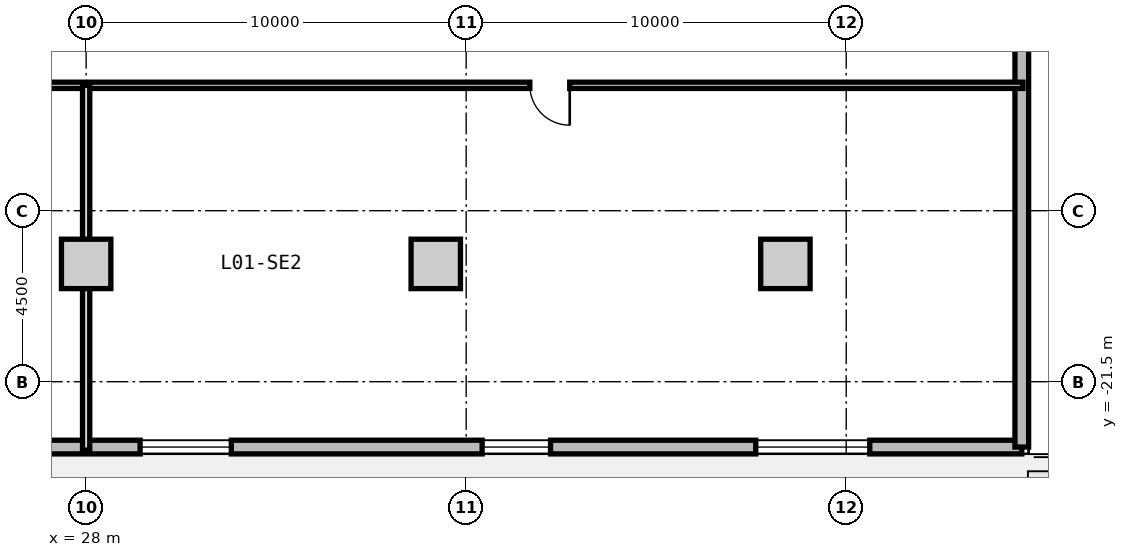
"""IFC4 building model, lengths in metres.
Left out: names, types, materials, properties, quantities, classifications, styles, units other than length and angle.
Written with IfcOpenShell. Run it as: python <this file> out.ifc"""

import sys

from ifc_helpers import new_model, si_unit, direction, frame, frame_2d, origin, origin_2d, place, context, subcontext, project, spatial, rectangle, extrude, source, transform, mapped, element, fill, save


model = new_model("IFC4")
c1 = context("Model", 3, precision=1e-05, world=origin(), true_north=direction((0.0, 1.0)))
c2 = subcontext(c1, "Body", "Model", "MODEL_VIEW")
j1 = project(units=[si_unit("LENGTHUNIT", "METRE"), si_unit("PLANEANGLEUNIT", "RADIAN")], contexts=[c1])
p1 = place(None, origin())
s1 = spatial("IfcSite", under=j1, at=p1, CompositionType="ELEMENT")
p2 = place(p1, origin())
s2 = spatial("IfcBuilding", under=s1, at=p2, CompositionType="ELEMENT")
p3 = place(p2, frame((0.0, 0.0, 4.2)))
s3 = spatial("IfcBuildingStorey", under=s2, at=p3, CompositionType="ELEMENT", Elevation=4.2)
m1 = source(origin(), c2, "Body", "SweptSolid", [
    extrude(rectangle(XDim=1.3, YDim=1.3, at=origin_2d()), origin(), (0.0, 0.0, 1.0), 4.2),
])
for number, where, z_axis, x_axis in (
    (1, (28.0, -18.4, 0.0), (0.0, 0.0, 1.0), (1.0, 0.0, 0.0)),
    (2, (37.2, -18.4, 0.0), (0.0, 0.0, 1.0), (1.0, 0.0, 0.0)),
    (3, (46.4, -18.4, 0.0), (0.0, 0.0, 1.0), (1.0, 0.0, 0.0)),
):
    element("IfcColumn", number, at=place(p3, frame(where, z_axis=z_axis, x_axis=x_axis)), inside=s3, PredefinedType="COLUMN", context=c2, shape_type="MappedRepresentation", body=[
        mapped(m1, transform((0.0, 0.0, 0.0), x_axis=(1.0, 0.0, 0.0), y_axis=(0.0, 1.0, 0.0), z_axis=(0.0, 0.0, 1.0), scale=1.0)),
    ])
m2 = source(origin(), c2, "Body", "SweptSolid", [
    extrude(rectangle(XDim=105.24, YDim=0.36, at=frame_2d((52.62, 0.0))), origin(), (0.0, 0.0, 1.0), 3.88),
])
p4 = place(p3, frame((52.62, -23.22, 0.0), z_axis=(0.0, 0.0, 1.0), x_axis=(-1.0, 0.0, 0.0)))
e4 = element("IfcWall", 4, at=p4, inside=s3, PredefinedType="SOLIDWALL", context=c2, shape_type="MappedRepresentation", body=[
    mapped(m2, transform((0.0, 0.0, 0.0), x_axis=(1.0, 0.0, 0.0), y_axis=(0.0, 1.0, 0.0), z_axis=(0.0, 0.0, 1.0), scale=1.0)),
])
p5 = place(p4, frame((54.97, 0.0, 0.0)))
e5 = element("IfcOpeningElement", 5, at=p5, cuts=e4, PredefinedType="OPENING", context=c2, shape_type="SweptSolid", body=[
    extrude(rectangle(XDim=1.15, YDim=2.25, at=frame_2d((0.575, 1.125))), frame((0.0, 0.19, 0.0), z_axis=(0.0, -1.0, 0.0), x_axis=(1.0, 0.0, 0.0)), (0.0, 0.0, 1.0), 0.38),
])
p6 = place(p4, frame((4.0, 0.0, 0.85)))
e6 = element("IfcOpeningElement", 6, at=p6, cuts=e4, PredefinedType="OPENING", context=c2, shape_type="SweptSolid", body=[
    extrude(rectangle(XDim=3.0, YDim=2.1, at=frame_2d((1.5, 1.05))), frame((0.0, 0.19, 0.0), z_axis=(0.0, -1.0, 0.0), x_axis=(1.0, 0.0, 0.0)), (0.0, 0.0, 1.0), 0.38),
])
p7 = place(p4, frame((12.4, 0.0, 0.9)))
e7 = element("IfcOpeningElement", 7, at=p7, cuts=e4, PredefinedType="OPENING", context=c2, shape_type="SweptSolid", body=[
    extrude(rectangle(XDim=1.8, YDim=2.0, at=frame_2d((0.9, 1.0))), frame((0.0, 0.19, 0.0), z_axis=(0.0, -1.0, 0.0), x_axis=(1.0, 0.0, 0.0)), (0.0, 0.0, 1.0), 0.38),
])
p8 = place(p4, frame((20.8, 0.0, 0.85)))
e8 = element("IfcOpeningElement", 8, at=p8, cuts=e4, PredefinedType="OPENING", context=c2, shape_type="SweptSolid", body=[
    extrude(rectangle(XDim=2.4, YDim=2.2, at=frame_2d((1.2, 1.1))), frame((0.0, 0.19, 0.0), z_axis=(0.0, -1.0, 0.0), x_axis=(1.0, 0.0, 0.0)), (0.0, 0.0, 1.0), 0.38),
])
p9 = place(p4, frame((29.2, 0.0, 0.85)))
e9 = element("IfcOpeningElement", 9, at=p9, cuts=e4, PredefinedType="OPENING", context=c2, shape_type="SweptSolid", body=[
    extrude(rectangle(XDim=3.0, YDim=2.1, at=frame_2d((1.5, 1.05))), frame((0.0, 0.19, 0.0), z_axis=(0.0, -1.0, 0.0), x_axis=(1.0, 0.0, 0.0)), (0.0, 0.0, 1.0), 0.38),
])
p10 = place(p4, frame((37.6, 0.0, 0.9)))
e10 = element("IfcOpeningElement", 10, at=p10, cuts=e4, PredefinedType="OPENING", context=c2, shape_type="SweptSolid", body=[
    extrude(rectangle(XDim=1.8, YDim=2.0, at=frame_2d((0.9, 1.0))), frame((0.0, 0.19, 0.0), z_axis=(0.0, -1.0, 0.0), x_axis=(1.0, 0.0, 0.0)), (0.0, 0.0, 1.0), 0.38),
])
p11 = place(p4, frame((46.0, 0.0, 0.85)))
e11 = element("IfcOpeningElement", 11, at=p11, cuts=e4, PredefinedType="OPENING", context=c2, shape_type="SweptSolid", body=[
    extrude(rectangle(XDim=2.4, YDim=2.2, at=frame_2d((1.2, 1.1))), frame((0.0, 0.19, 0.0), z_axis=(0.0, -1.0, 0.0), x_axis=(1.0, 0.0, 0.0)), (0.0, 0.0, 1.0), 0.38),
])
p12 = place(p4, frame((62.8, 0.0, 0.9)))
e12 = element("IfcOpeningElement", 12, at=p12, cuts=e4, PredefinedType="OPENING", context=c2, shape_type="SweptSolid", body=[
    extrude(rectangle(XDim=1.8, YDim=2.0, at=frame_2d((0.9, 1.0))), frame((0.0, 0.19, 0.0), z_axis=(0.0, -1.0, 0.0), x_axis=(1.0, 0.0, 0.0)), (0.0, 0.0, 1.0), 0.38),
])
p13 = place(p4, frame((71.2, 0.0, 0.85)))
e13 = element("IfcOpeningElement", 13, at=p13, cuts=e4, PredefinedType="OPENING", context=c2, shape_type="SweptSolid", body=[
    extrude(rectangle(XDim=2.4, YDim=2.2, at=frame_2d((1.2, 1.1))), frame((0.0, 0.19, 0.0), z_axis=(0.0, -1.0, 0.0), x_axis=(1.0, 0.0, 0.0)), (0.0, 0.0, 1.0), 0.38),
])
p14 = place(p4, frame((88.0, 0.0, 0.9)))
e14 = element("IfcOpeningElement", 14, at=p14, cuts=e4, PredefinedType="OPENING", context=c2, shape_type="SweptSolid", body=[
    extrude(rectangle(XDim=1.8, YDim=2.0, at=frame_2d((0.9, 1.0))), frame((0.0, 0.19, 0.0), z_axis=(0.0, -1.0, 0.0), x_axis=(1.0, 0.0, 0.0)), (0.0, 0.0, 1.0), 0.38),
])
m3 = source(origin(), c2, "Body", "SweptSolid", [
    extrude(rectangle(XDim=46.44, YDim=0.36, at=frame_2d((23.22, 0.0))), origin(), (0.0, 0.0, 1.0), 3.88),
])
p15 = place(p3, frame((52.62, 23.22, 0.0), z_axis=(0.0, 0.0, 1.0), x_axis=(0.0, -1.0, 0.0)))
e15 = element("IfcWall", 15, at=p15, inside=s3, PredefinedType="SOLIDWALL", context=c2, shape_type="MappedRepresentation", body=[
    mapped(m3, transform((0.0, 0.0, 0.0), x_axis=(1.0, 0.0, 0.0), y_axis=(0.0, 1.0, 0.0), z_axis=(0.0, 0.0, 1.0), scale=1.0)),
])
p16 = place(p15, frame((4.0, 0.0, 0.85)))
e16 = element("IfcOpeningElement", 16, at=p16, cuts=e15, PredefinedType="OPENING", context=c2, shape_type="SweptSolid", body=[
    extrude(rectangle(XDim=3.0, YDim=2.1, at=frame_2d((1.5, 1.05))), frame((0.0, 0.19, 0.0), z_axis=(0.0, -1.0, 0.0), x_axis=(1.0, 0.0, 0.0)), (0.0, 0.0, 1.0), 0.38),
])
p17 = place(p15, frame((29.2, 0.0, 0.85)))
e17 = element("IfcOpeningElement", 17, at=p17, cuts=e15, PredefinedType="OPENING", context=c2, shape_type="SweptSolid", body=[
    extrude(rectangle(XDim=3.0, YDim=2.1, at=frame_2d((1.5, 1.05))), frame((0.0, 0.19, 0.0), z_axis=(0.0, -1.0, 0.0), x_axis=(1.0, 0.0, 0.0)), (0.0, 0.0, 1.0), 0.38),
])
m4 = source(origin(), c2, "Body", "SweptSolid", [
    extrude(rectangle(XDim=37.6, YDim=0.165, at=frame_2d((18.8, 0.0))), origin(), (0.0, 0.0, 1.0), 3.865),
])
p18 = place(p3, frame((15.05, -13.7, 0.0), z_axis=(0.0, 0.0, 1.0), x_axis=(1.0, 0.0, 0.0)))
e18 = element("IfcWall", 18, at=p18, inside=s3, PredefinedType="PARTITIONING", context=c2, shape_type="MappedRepresentation", body=[
    mapped(m4, transform((0.0, 0.0, 0.0), x_axis=(1.0, 0.0, 0.0), y_axis=(0.0, 1.0, 0.0), z_axis=(0.0, 0.0, 1.0), scale=1.0)),
])
p19 = place(p18, frame((5.95, 0.0, 0.0)))
e19 = element("IfcOpeningElement", 19, at=p19, cuts=e18, PredefinedType="OPENING", context=c2, shape_type="SweptSolid", body=[
    extrude(rectangle(XDim=1.05, YDim=2.15, at=frame_2d((0.525, 1.075))), frame((0.0, 0.093, 0.0), z_axis=(0.0, -1.0, 0.0), x_axis=(1.0, 0.0, 0.0)), (0.0, 0.0, 1.0), 0.185),
])
p20 = place(p18, frame((24.625, 0.0, 0.0)))
e20 = element("IfcOpeningElement", 20, at=p20, cuts=e18, PredefinedType="OPENING", context=c2, shape_type="SweptSolid", body=[
    extrude(rectangle(XDim=1.05, YDim=2.15, at=frame_2d((0.525, 1.075))), frame((0.0, 0.093, 0.0), z_axis=(0.0, -1.0, 0.0), x_axis=(1.0, 0.0, 0.0)), (0.0, 0.0, 1.0), 0.185),
])
m5 = source(origin(), c2, "Body", "SweptSolid", [
    extrude(rectangle(XDim=9.6, YDim=0.19, at=frame_2d((4.8, 0.0))), origin(), (0.0, 0.0, 1.0), 3.865),
])
p21 = place(p3, frame((28.0, -23.3, 0.0), z_axis=(0.0, 0.0, 1.0), x_axis=(0.0, 1.0, 0.0)))
e21 = element("IfcWall", 21, at=p21, inside=s3, PredefinedType="PARTITIONING", context=c2, shape_type="MappedRepresentation", body=[
    mapped(m5, transform((0.0, 0.0, 0.0), x_axis=(1.0, 0.0, 0.0), y_axis=(0.0, 1.0, 0.0), z_axis=(0.0, 0.0, 1.0), scale=1.0)),
])
m6 = source(origin(), c2, "Body", "SweptSolid", [
    extrude(rectangle(XDim=3.0, YDim=2.1, at=frame_2d((1.5, 1.05))), frame((0.0, 0.03, 0.0), z_axis=(0.0, -1.0, 0.0), x_axis=(1.0, 0.0, 0.0)), (0.0, 0.0, 1.0), 0.06),
])
p22 = place(p6, origin())
e22 = element("IfcWindow", 22, at=p22, inside=s3, PartitioningType="SINGLE_PANEL", PredefinedType="WINDOW", context=c2, shape_type="MappedRepresentation", body=[
    mapped(m6, transform((0.0, 0.0, 0.0), x_axis=(1.0, 0.0, 0.0), y_axis=(0.0, 1.0, 0.0), z_axis=(0.0, 0.0, 1.0), scale=1.0)),
])
fill(e6, e22)
m7 = source(origin(), c2, "Body", "SweptSolid", [
    extrude(rectangle(XDim=1.8, YDim=2.0, at=frame_2d((0.9, 1.0))), frame((0.0, 0.03, 0.0), z_axis=(0.0, -1.0, 0.0), x_axis=(1.0, 0.0, 0.0)), (0.0, 0.0, 1.0), 0.06),
])
p23 = place(p7, origin())
e23 = element("IfcWindow", 23, at=p23, inside=s3, PartitioningType="SINGLE_PANEL", PredefinedType="WINDOW", context=c2, shape_type="MappedRepresentation", body=[
    mapped(m7, transform((0.0, 0.0, 0.0), x_axis=(1.0, 0.0, 0.0), y_axis=(0.0, 1.0, 0.0), z_axis=(0.0, 0.0, 1.0), scale=1.0)),
])
fill(e7, e23)
m8 = source(origin(), c2, "Body", "SweptSolid", [
    extrude(rectangle(XDim=2.4, YDim=2.2, at=frame_2d((1.2, 1.1))), frame((0.0, 0.03, 0.0), z_axis=(0.0, -1.0, 0.0), x_axis=(1.0, 0.0, 0.0)), (0.0, 0.0, 1.0), 0.06),
])
p24 = place(p8, origin())
e24 = element("IfcWindow", 24, at=p24, inside=s3, PartitioningType="SINGLE_PANEL", PredefinedType="WINDOW", context=c2, shape_type="MappedRepresentation", body=[
    mapped(m8, transform((0.0, 0.0, 0.0), x_axis=(1.0, 0.0, 0.0), y_axis=(0.0, 1.0, 0.0), z_axis=(0.0, 0.0, 1.0), scale=1.0)),
])
fill(e8, e24)
m9 = source(origin(), c2, "Body", "SweptSolid", [
    extrude(rectangle(XDim=1.05, YDim=2.15, at=frame_2d((0.525, 1.075))), frame((0.0, 0.025, 0.0), z_axis=(0.0, -1.0, 0.0), x_axis=(1.0, 0.0, 0.0)), (0.0, 0.0, 1.0), 0.05),
])
p25 = place(p20, frame((1.05, 0.0, 0.0), z_axis=(0.0, 0.0, 1.0), x_axis=(-1.0, 0.0, 0.0)))
e25 = element("IfcDoor", 25, at=p25, inside=s3, OperationType="SINGLE_SWING_LEFT", PredefinedType="DOOR", context=c2, shape_type="MappedRepresentation", body=[
    mapped(m9, transform((0.0, 0.0, 0.0), x_axis=(1.0, 0.0, 0.0), y_axis=(0.0, 1.0, 0.0), z_axis=(0.0, 0.0, 1.0), scale=1.0)),
])
fill(e20, e25)
save(model, sys.argv[1])
